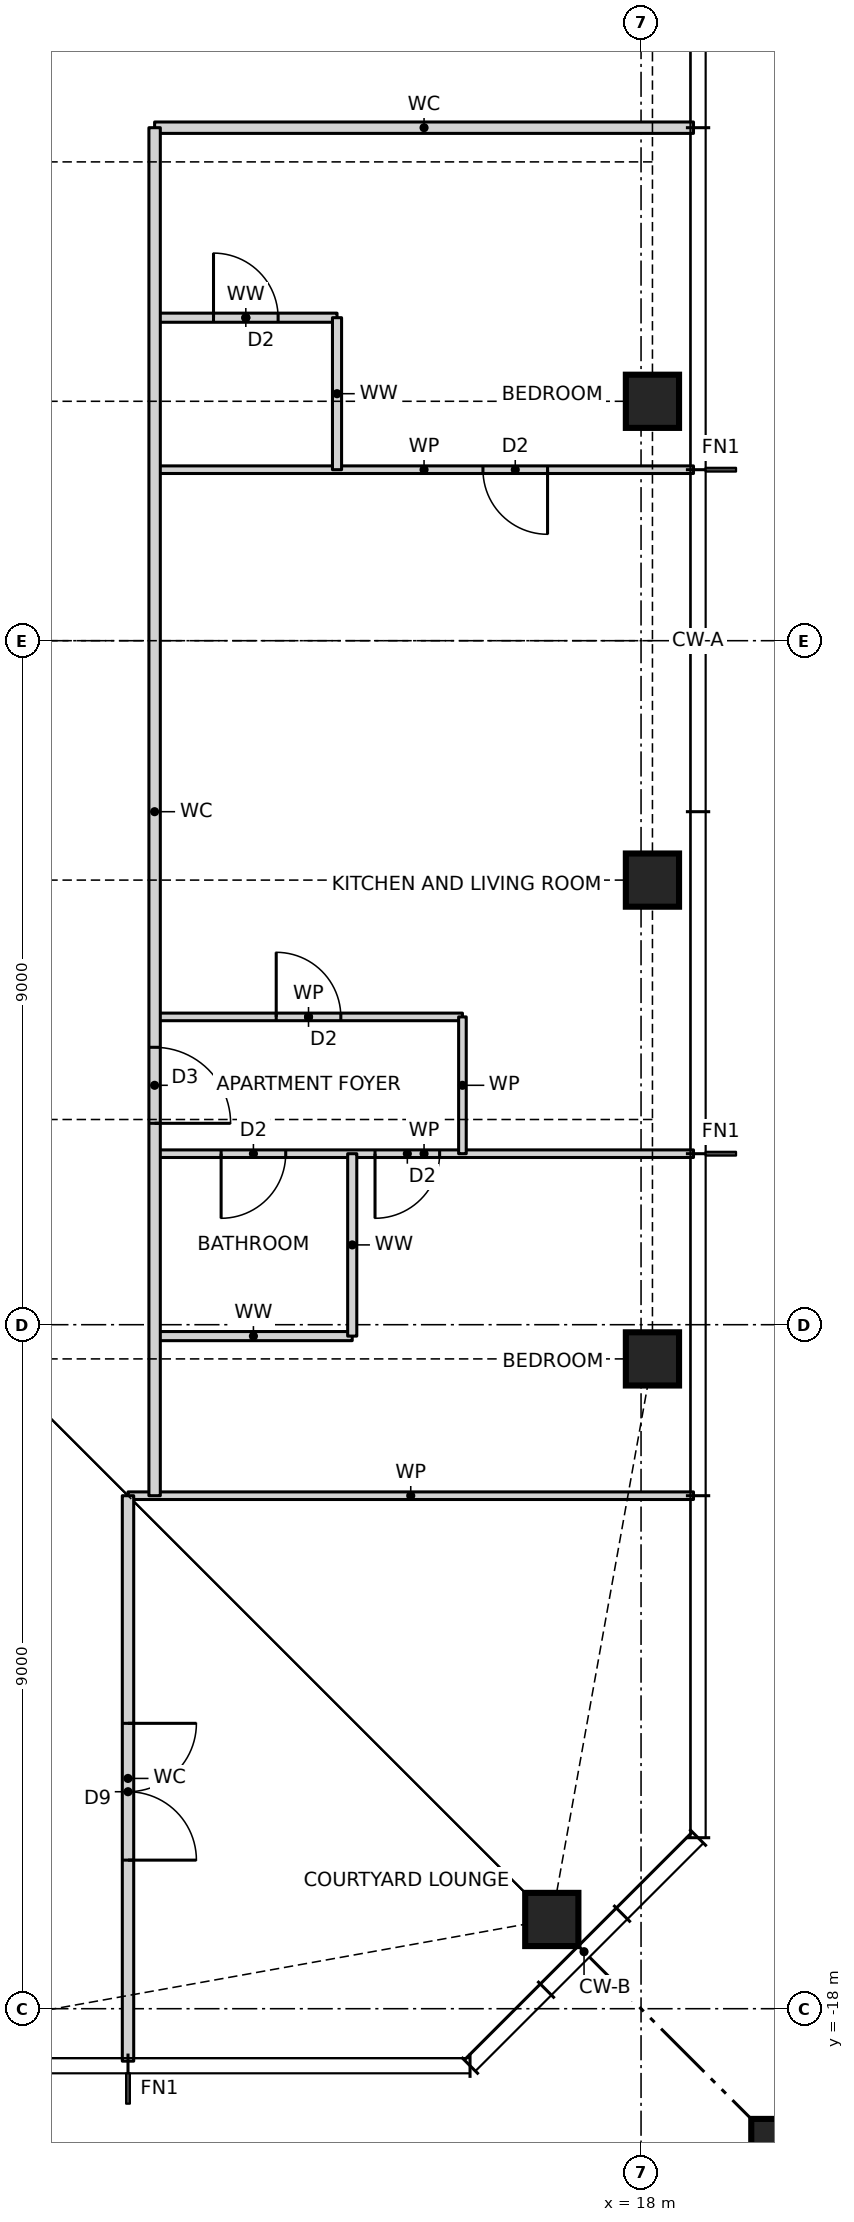
"""IFC4 building model, lengths in metres.
Left out: names, types, materials, properties, quantities, classifications, styles, units other than length and angle.
Written with IfcOpenShell. Run it as: python <this file> out.ifc"""

import sys

from ifc_helpers import new_model, si_unit, direction, frame, frame_2d, origin, origin_2d, place, context, subcontext, project, spatial, rectangle, hollow_rectangle, i_section, extrude, element, fill, save


model = new_model("IFC4")
c1 = context("Model", 3, precision=1e-05, world=origin(), true_north=direction((0.0, 1.0)))
c2 = subcontext(c1, "Body", "Model", "MODEL_VIEW")
j1 = project(units=[si_unit("LENGTHUNIT", "METRE"), si_unit("PLANEANGLEUNIT", "RADIAN")], contexts=[c1])
p1 = place(None, origin())
s1 = spatial("IfcSite", under=j1, at=p1, CompositionType="ELEMENT")
p2 = place(p1, origin())
s2 = spatial("IfcBuilding", under=s1, at=p2, CompositionType="ELEMENT")
p3 = place(p2, frame((0.0, 0.0, 181.0)))
s3 = spatial("IfcBuildingStorey", under=s2, at=p3, CompositionType="ELEMENT", Elevation=181.0)
for number, where, z_axis, x_axis in (
    (1, (16.826, -16.826, 0.0), (0.0, 0.0, 1.0), (1.0, 0.0, 0.0)),
    (2, (18.15, -9.45, 0.0), (0.0, 0.0, 1.0), (1.0, 0.0, 0.0)),
    (3, (18.15, -3.15, 0.0), (0.0, 0.0, 1.0), (1.0, 0.0, 0.0)),
    (4, (18.15, 3.15, 0.0), (0.0, 0.0, 1.0), (1.0, 0.0, 0.0)),
):
    element("IfcColumn", number, at=place(p3, frame(where, z_axis=z_axis, x_axis=x_axis)), inside=s3, PredefinedType="COLUMN", context=c2, shape_type="SweptSolid", body=[
        extrude(hollow_rectangle(XDim=0.7, YDim=0.7, WallThickness=0.06, at=origin_2d()), origin(), (0.0, 0.0, 1.0), 3.5),
    ])
p4 = place(p3, frame((21.65, -21.65, 0.0), z_axis=(0.0, 0.0, 1.0), x_axis=(1.0, 0.0, 0.0)))
e5 = element("IfcColumn", 5, at=p4, inside=s3, PredefinedType="COLUMN", context=c2, shape_type="SweptSolid", body=[
    extrude(rectangle(XDim=4.4, YDim=4.4, at=origin_2d()), origin(), (0.0, 0.0, 1.0), 3.5),
    extrude(i_section(OverallWidth=0.478, OverallDepth=0.599, WebThickness=0.1, FlangeThickness=0.14, at=origin_2d()), origin(), (0.0, 0.0, 1.0), 3.5),
])
p5 = place(p3, frame((11.25, -11.25, 0.0), z_axis=(0.0, 0.0, 1.0), x_axis=(1.0, 0.0, 0.0)))
e6 = element("IfcWall", 6, at=p5, inside=s3, PredefinedType="PARTITIONING", context=c2, shape_type="SweptSolid", body=[
    extrude(rectangle(XDim=7.44, YDim=0.1, at=frame_2d((3.72, 0.0))), origin(), (0.0, 0.0, 1.0), 3.27),
])
p6 = place(p3, frame((11.6, -9.15, 0.0), z_axis=(0.0, 0.0, 1.0), x_axis=(1.0, 0.0, 0.0)))
e7 = element("IfcWall", 7, at=p6, inside=s3, PredefinedType="PARTITIONING", context=c2, shape_type="SweptSolid", body=[
    extrude(rectangle(XDim=2.6, YDim=0.12, at=frame_2d((1.3, 0.0))), origin(), (0.0, 0.0, 1.0), 3.27),
])
p7 = place(p3, frame((11.6, -6.75, 0.0), z_axis=(0.0, 0.0, 1.0), x_axis=(1.0, 0.0, 0.0)))
e8 = element("IfcWall", 8, at=p7, inside=s3, PredefinedType="PARTITIONING", context=c2, shape_type="SweptSolid", body=[
    extrude(rectangle(XDim=7.09, YDim=0.1, at=frame_2d((3.545, 0.0))), origin(), (0.0, 0.0, 1.0), 3.27),
])
p8 = place(p7, frame((2.9, 0.0, 0.0)))
e9 = element("IfcOpeningElement", 9, at=p8, cuts=e8, PredefinedType="OPENING", context=c2, shape_type="SweptSolid", body=[
    extrude(rectangle(XDim=0.85, YDim=2.1, at=frame_2d((0.425, 1.05))), frame((0.0, 0.06, 0.0), z_axis=(0.0, -1.0, 0.0), x_axis=(1.0, 0.0, 0.0)), (0.0, 0.0, 1.0), 0.12),
])
p9 = place(p7, frame((0.875, 0.0, 0.0)))
e10 = element("IfcOpeningElement", 10, at=p9, cuts=e8, PredefinedType="OPENING", context=c2, shape_type="SweptSolid", body=[
    extrude(rectangle(XDim=0.85, YDim=2.1, at=frame_2d((0.425, 1.05))), frame((0.0, 0.06, 0.0), z_axis=(0.0, -1.0, 0.0), x_axis=(1.0, 0.0, 0.0)), (0.0, 0.0, 1.0), 0.12),
])
p10 = place(p3, frame((11.6, -4.95, 0.0), z_axis=(0.0, 0.0, 1.0), x_axis=(1.0, 0.0, 0.0)))
e11 = element("IfcWall", 11, at=p10, inside=s3, PredefinedType="PARTITIONING", context=c2, shape_type="SweptSolid", body=[
    extrude(rectangle(XDim=4.05, YDim=0.1, at=frame_2d((2.025, 0.0))), origin(), (0.0, 0.0, 1.0), 3.27),
])
p11 = place(p10, frame((1.6, 0.0, 0.0)))
e12 = element("IfcOpeningElement", 12, at=p11, cuts=e11, PredefinedType="OPENING", context=c2, shape_type="SweptSolid", body=[
    extrude(rectangle(XDim=0.85, YDim=2.1, at=frame_2d((0.425, 1.05))), frame((0.0, 0.06, 0.0), z_axis=(0.0, -1.0, 0.0), x_axis=(1.0, 0.0, 0.0)), (0.0, 0.0, 1.0), 0.12),
])
p12 = place(p3, frame((11.6, 2.25, 0.0), z_axis=(0.0, 0.0, 1.0), x_axis=(1.0, 0.0, 0.0)))
e13 = element("IfcWall", 13, at=p12, inside=s3, PredefinedType="PARTITIONING", context=c2, shape_type="SweptSolid", body=[
    extrude(rectangle(XDim=7.09, YDim=0.1, at=frame_2d((3.545, 0.0))), origin(), (0.0, 0.0, 1.0), 3.27),
])
p13 = place(p12, frame((4.32, 0.0, 0.0)))
e14 = element("IfcOpeningElement", 14, at=p13, cuts=e13, PredefinedType="OPENING", context=c2, shape_type="SweptSolid", body=[
    extrude(rectangle(XDim=0.85, YDim=2.1, at=frame_2d((0.425, 1.05))), frame((0.0, 0.06, 0.0), z_axis=(0.0, -1.0, 0.0), x_axis=(1.0, 0.0, 0.0)), (0.0, 0.0, 1.0), 0.12),
])
p14 = place(p3, frame((11.6, 4.25, 0.0), z_axis=(0.0, 0.0, 1.0), x_axis=(1.0, 0.0, 0.0)))
e15 = element("IfcWall", 15, at=p14, inside=s3, PredefinedType="PARTITIONING", context=c2, shape_type="SweptSolid", body=[
    extrude(rectangle(XDim=2.4, YDim=0.12, at=frame_2d((1.2, 0.0))), origin(), (0.0, 0.0, 1.0), 3.27),
])
p15 = place(p14, frame((0.775, 0.0, 0.0)))
e16 = element("IfcOpeningElement", 16, at=p15, cuts=e15, PredefinedType="OPENING", context=c2, shape_type="SweptSolid", body=[
    extrude(rectangle(XDim=0.85, YDim=2.1, at=frame_2d((0.425, 1.05))), frame((0.0, 0.07, 0.0), z_axis=(0.0, -1.0, 0.0), x_axis=(1.0, 0.0, 0.0)), (0.0, 0.0, 1.0), 0.14),
])
p16 = place(p3, frame((11.6, 6.75, 0.0), z_axis=(0.0, 0.0, 1.0), x_axis=(1.0, 0.0, 0.0)))
e17 = element("IfcWall", 17, at=p16, inside=s3, PredefinedType="PARTITIONING", context=c2, shape_type="SweptSolid", body=[
    extrude(rectangle(XDim=7.09, YDim=0.15, at=frame_2d((3.545, 0.0))), origin(), (0.0, 0.0, 1.0), 3.27),
])
p17 = place(p3, frame((15.65, -6.75, 0.0), z_axis=(0.0, 0.0, 1.0), x_axis=(0.0, 1.0, 0.0)))
e18 = element("IfcWall", 18, at=p17, inside=s3, PredefinedType="PARTITIONING", context=c2, shape_type="SweptSolid", body=[
    extrude(rectangle(XDim=1.8, YDim=0.1, at=frame_2d((0.9, 0.0))), origin(), (0.0, 0.0, 1.0), 3.27),
])
p18 = place(p3, frame((14.2, -9.15, 0.0), z_axis=(0.0, 0.0, 1.0), x_axis=(0.0, 1.0, 0.0)))
e19 = element("IfcWall", 19, at=p18, inside=s3, PredefinedType="PARTITIONING", context=c2, shape_type="SweptSolid", body=[
    extrude(rectangle(XDim=2.4, YDim=0.12, at=frame_2d((1.2, 0.0))), origin(), (0.0, 0.0, 1.0), 3.27),
])
p19 = place(p3, frame((14.0, 2.25, 0.0), z_axis=(0.0, 0.0, 1.0), x_axis=(0.0, 1.0, 0.0)))
e20 = element("IfcWall", 20, at=p19, inside=s3, PredefinedType="PARTITIONING", context=c2, shape_type="SweptSolid", body=[
    extrude(rectangle(XDim=2.0, YDim=0.12, at=frame_2d((1.0, 0.0))), origin(), (0.0, 0.0, 1.0), 3.27),
])
p20 = place(p3, frame((11.6, -11.25, 0.0), z_axis=(0.0, 0.0, 1.0), x_axis=(0.0, 1.0, 0.0)))
e21 = element("IfcWall", 21, at=p20, inside=s3, PredefinedType="PARTITIONING", context=c2, shape_type="SweptSolid", body=[
    extrude(rectangle(XDim=18.0, YDim=0.15, at=frame_2d((9.0, 0.0))), origin(), (0.0, 0.0, 1.0), 3.27),
])
p21 = place(p20, frame((4.9, 0.0, 0.0)))
e22 = element("IfcOpeningElement", 22, at=p21, cuts=e21, PredefinedType="OPENING", context=c2, shape_type="SweptSolid", body=[
    extrude(rectangle(XDim=1.0, YDim=2.1, at=frame_2d((0.5, 1.05))), frame((0.0, 0.085, 0.0), z_axis=(0.0, -1.0, 0.0), x_axis=(1.0, 0.0, 0.0)), (0.0, 0.0, 1.0), 0.17),
])
p22 = place(p3, frame((11.25, -18.69, 0.0), z_axis=(0.0, 0.0, 1.0), x_axis=(0.0, 1.0, 0.0)))
e23 = element("IfcWall", 23, at=p22, inside=s3, PredefinedType="PARTITIONING", context=c2, shape_type="SweptSolid", body=[
    extrude(rectangle(XDim=7.44, YDim=0.15, at=frame_2d((3.72, 0.0))), origin(), (0.0, 0.0, 1.0), 3.27),
])
p23 = place(p22, frame((2.645, 0.0, 0.0)))
e24 = element("IfcOpeningElement", 24, at=p23, cuts=e23, PredefinedType="OPENING", context=c2, shape_type="SweptSolid", body=[
    extrude(rectangle(XDim=1.8, YDim=2.1, at=frame_2d((0.9, 1.05))), frame((0.0, 0.085, 0.0), z_axis=(0.0, -1.0, 0.0), x_axis=(1.0, 0.0, 0.0)), (0.0, 0.0, 1.0), 0.17),
])
p24 = place(p21, frame((1.0, 0.0, 0.0), z_axis=(0.0, 0.0, 1.0), x_axis=(-1.0, 0.0, 0.0)))
e25 = element("IfcDoor", 25, at=p24, inside=s3, OperationType="SINGLE_SWING_RIGHT", PredefinedType="DOOR", context=c2, shape_type="SweptSolid", body=[
    extrude(rectangle(XDim=1.0, YDim=2.1, at=frame_2d((0.5, 1.05))), frame((0.0, 0.025, 0.0), z_axis=(0.0, -1.0, 0.0), x_axis=(1.0, 0.0, 0.0)), (0.0, 0.0, 1.0), 0.05),
])
fill(e22, e25)
p25 = place(p11, origin())
e26 = element("IfcDoor", 26, at=p25, inside=s3, OperationType="SINGLE_SWING_LEFT", PredefinedType="DOOR", context=c2, shape_type="SweptSolid", body=[
    extrude(rectangle(XDim=0.85, YDim=2.1, at=frame_2d((0.425, 1.05))), frame((0.0, 0.025, 0.0), z_axis=(0.0, -1.0, 0.0), x_axis=(1.0, 0.0, 0.0)), (0.0, 0.0, 1.0), 0.05),
])
fill(e12, e26)
p26 = place(p8, frame((0.85, 0.0, 0.0), z_axis=(0.0, 0.0, 1.0), x_axis=(-1.0, 0.0, 0.0)))
e27 = element("IfcDoor", 27, at=p26, inside=s3, OperationType="SINGLE_SWING_RIGHT", PredefinedType="DOOR", context=c2, shape_type="SweptSolid", body=[
    extrude(rectangle(XDim=0.85, YDim=2.1, at=frame_2d((0.425, 1.05))), frame((0.0, 0.025, 0.0), z_axis=(0.0, -1.0, 0.0), x_axis=(1.0, 0.0, 0.0)), (0.0, 0.0, 1.0), 0.05),
])
fill(e9, e27)
p27 = place(p9, frame((0.85, 0.0, 0.0), z_axis=(0.0, 0.0, 1.0), x_axis=(-1.0, 0.0, 0.0)))
e28 = element("IfcDoor", 28, at=p27, inside=s3, OperationType="SINGLE_SWING_RIGHT", PredefinedType="DOOR", context=c2, shape_type="SweptSolid", body=[
    extrude(rectangle(XDim=0.85, YDim=2.1, at=frame_2d((0.425, 1.05))), frame((0.0, 0.025, 0.0), z_axis=(0.0, -1.0, 0.0), x_axis=(1.0, 0.0, 0.0)), (0.0, 0.0, 1.0), 0.05),
])
fill(e10, e28)
p28 = place(p13, frame((0.85, 0.0, 0.0), z_axis=(0.0, 0.0, 1.0), x_axis=(-1.0, 0.0, 0.0)))
e29 = element("IfcDoor", 29, at=p28, inside=s3, OperationType="SINGLE_SWING_LEFT", PredefinedType="DOOR", context=c2, shape_type="SweptSolid", body=[
    extrude(rectangle(XDim=0.85, YDim=2.1, at=frame_2d((0.425, 1.05))), frame((0.0, 0.025, 0.0), z_axis=(0.0, -1.0, 0.0), x_axis=(1.0, 0.0, 0.0)), (0.0, 0.0, 1.0), 0.05),
])
fill(e14, e29)
p29 = place(p15, origin())
e30 = element("IfcDoor", 30, at=p29, inside=s3, OperationType="SINGLE_SWING_LEFT", PredefinedType="DOOR", context=c2, shape_type="SweptSolid", body=[
    extrude(rectangle(XDim=0.85, YDim=2.1, at=frame_2d((0.425, 1.05))), frame((0.0, 0.025, 0.0), z_axis=(0.0, -1.0, 0.0), x_axis=(1.0, 0.0, 0.0)), (0.0, 0.0, 1.0), 0.05),
])
fill(e16, e30)
p30 = place(p23, frame((1.8, 0.0, 0.0), z_axis=(0.0, 0.0, 1.0), x_axis=(-1.0, 0.0, 0.0)))
e31 = element("IfcDoor", 31, at=p30, inside=s3, OperationType="DOUBLE_DOOR_SINGLE_SWING", PredefinedType="DOOR", context=c2, shape_type="SweptSolid", body=[
    extrude(rectangle(XDim=1.8, YDim=2.1, at=frame_2d((0.9, 1.05))), frame((0.0, 0.025, 0.0), z_axis=(0.0, -1.0, 0.0), x_axis=(1.0, 0.0, 0.0)), (0.0, 0.0, 1.0), 0.05),
])
fill(e24, e31)
save(model, sys.argv[1])
